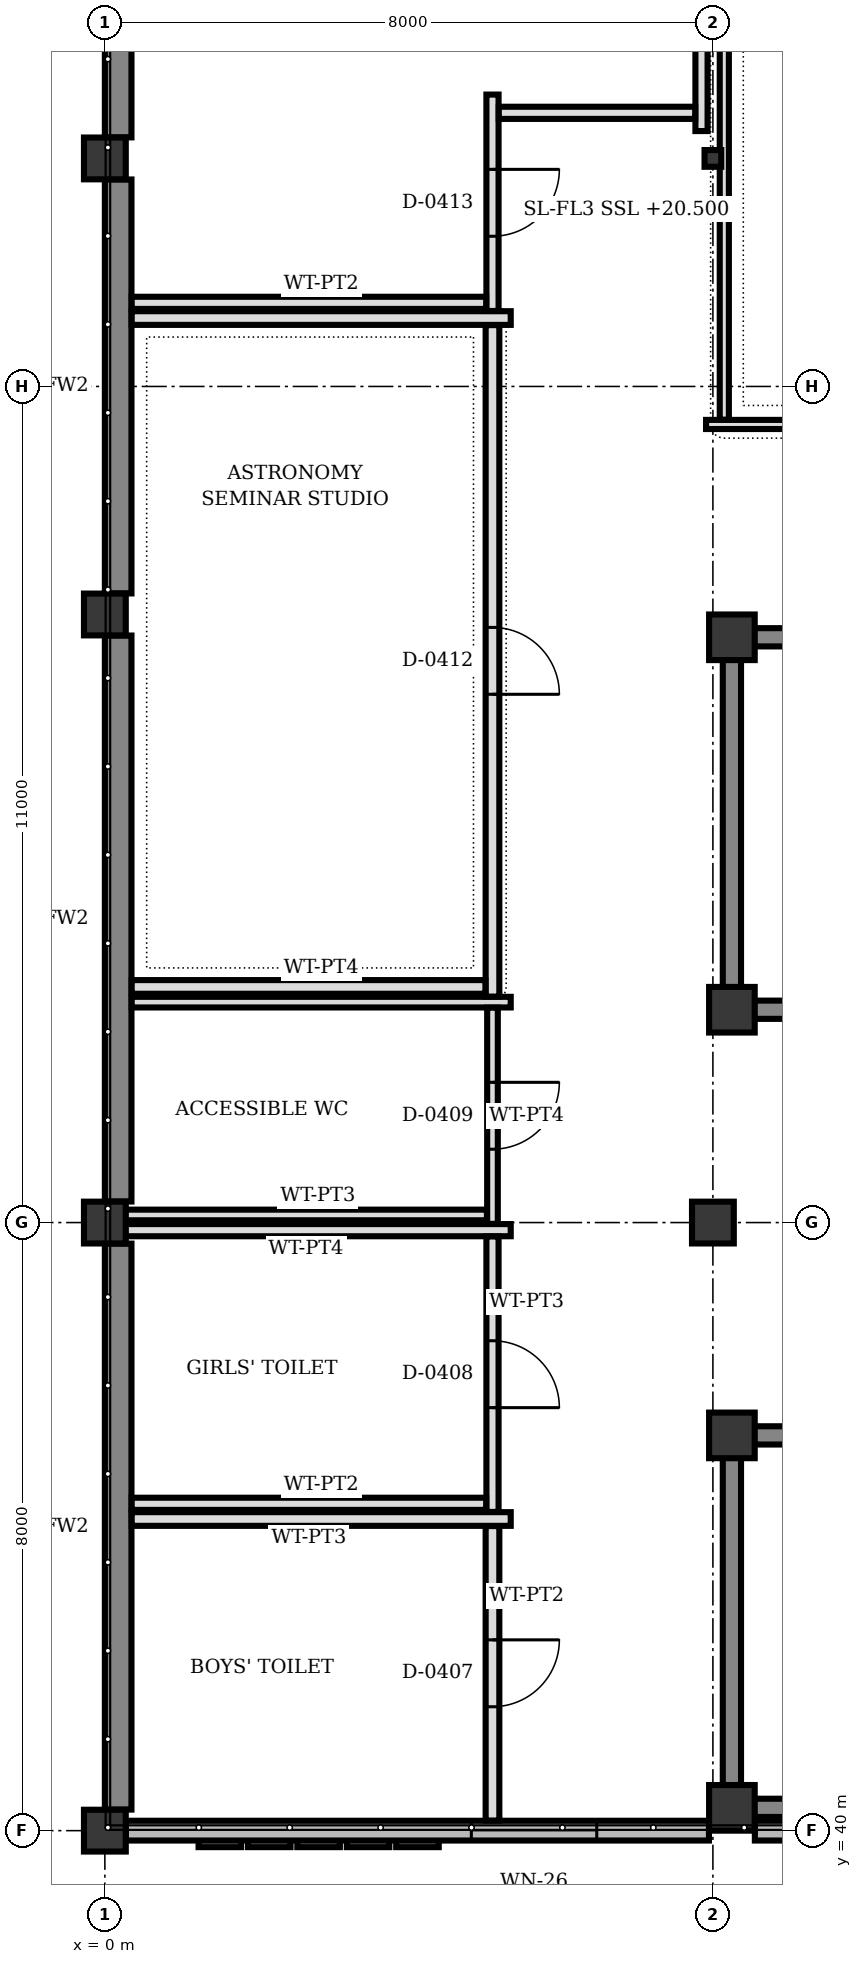
"""IFC4 building model, lengths in metres.
Left out: names, types, materials, properties, quantities, classifications, styles, units other than length and angle.
Written with IfcOpenShell. Run it as: python <this file> out.ifc"""

import sys

from ifc_helpers import new_model, si_unit, direction, frame, frame_2d, origin, origin_2d, place, context, subcontext, project, spatial, rectangle, hollow_rectangle, extrude, element, fill, save


model = new_model("IFC4")
c1 = context("Model", 3, precision=1e-05, world=origin(), true_north=direction((0.0, 1.0)))
c2 = subcontext(c1, "Body", "Model", "MODEL_VIEW")
j1 = project(units=[si_unit("LENGTHUNIT", "METRE"), si_unit("PLANEANGLEUNIT", "RADIAN")], contexts=[c1])
p1 = place(None, origin())
s1 = spatial("IfcSite", under=j1, at=p1, CompositionType="ELEMENT")
p2 = place(p1, origin())
s2 = spatial("IfcBuilding", under=s1, at=p2, CompositionType="ELEMENT")
p3 = place(p2, frame((0.0, 0.0, 20.5)))
s3 = spatial("IfcBuildingStorey", under=s2, at=p3, CompositionType="ELEMENT", Elevation=20.5)
for number, where, z_axis, x_axis in (
    (1, (8.25, 40.3, 0.0), (0.0, 0.0, 1.0), (1.0, 0.0, 0.0)),
    (2, (8.25, 45.2, 0.0), (0.0, 0.0, 1.0), (1.0, 0.0, 0.0)),
    (3, (8.25, 50.8, 0.0), (0.0, 0.0, 1.0), (1.0, 0.0, 0.0)),
    (4, (8.25, 55.7, 0.0), (0.0, 0.0, 1.0), (1.0, 0.0, 0.0)),
):
    element("IfcColumn", number, at=place(p3, frame(where, z_axis=z_axis, x_axis=x_axis)), inside=s3, PredefinedType="COLUMN", context=c2, shape_type="SweptSolid", body=[
        extrude(rectangle(XDim=0.6, YDim=0.6, at=origin_2d()), origin(), (0.0, 0.0, 1.0), 4.0),
    ])
for number, where, z_axis, x_axis in (
    (5, (0.0, 40.0, 0.0), (0.0, 0.0, 1.0), (1.0, 0.0, 0.0)),
    (6, (0.0, 48.0, 0.0), (0.0, 0.0, 1.0), (1.0, 0.0, 0.0)),
    (7, (0.0, 56.0, 0.0), (0.0, 0.0, 1.0), (1.0, 0.0, 0.0)),
    (8, (0.0, 62.0, 0.0), (0.0, 0.0, 1.0), (1.0, 0.0, 0.0)),
    (9, (8.0, 48.0, 0.0), (0.0, 0.0, 1.0), (1.0, 0.0, 0.0)),
):
    element("IfcColumn", number, at=place(p3, frame(where, z_axis=z_axis, x_axis=x_axis)), inside=s3, PredefinedType="COLUMN", context=c2, shape_type="SweptSolid", body=[
        extrude(rectangle(XDim=0.55, YDim=0.55, at=origin_2d()), origin(), (0.0, 0.0, 1.0), 4.0),
    ])
p4 = place(p3, frame((8.0, 62.0, 0.0), z_axis=(0.0, 0.0, 1.0), x_axis=(1.0, 0.0, 0.0)))
e10 = element("IfcColumn", 10, at=p4, inside=s3, PredefinedType="COLUMN", context=c2, shape_type="SweptSolid", body=[
    extrude(hollow_rectangle(XDim=0.22, YDim=0.22, WallThickness=0.01, at=origin_2d()), origin(), (0.0, 0.0, 1.0), 4.0),
])
p5 = place(p3, frame((16.0, 40.0, 0.0), z_axis=(0.0, 0.0, 1.0), x_axis=(-1.0, 0.0, 0.0)))
e11 = element("IfcWall", 11, at=p5, inside=s3, PredefinedType="SOLIDWALL", context=c2, shape_type="SweptSolid", body=[
    extrude(rectangle(XDim=7.448, YDim=0.26, at=frame_2d((3.724, 0.0))), origin(), (0.0, 0.0, 1.0), 3.55),
])
p6 = place(p3, frame((7.948, 40.0, 0.0), z_axis=(0.0, 0.0, 1.0), x_axis=(-1.0, 0.0, 0.0)))
e12 = element("IfcWall", 12, at=p6, inside=s3, PredefinedType="SOLIDWALL", context=c2, shape_type="SweptSolid", body=[
    extrude(rectangle(XDim=7.671, YDim=0.26, at=frame_2d((3.835, 0.0))), origin(), (0.0, 0.0, 1.0), 3.55),
])
p7 = place(p6, frame((1.476, 0.0, 0.9)))
e13 = element("IfcOpeningElement", 13, at=p7, cuts=e12, PredefinedType="OPENING", context=c2, shape_type="SweptSolid", body=[
    extrude(rectangle(XDim=1.65, YDim=1.4, at=frame_2d((0.825, 0.7))), frame((0.0, 0.14, 0.0), z_axis=(0.0, -1.0, 0.0), x_axis=(1.0, 0.0, 0.0)), (0.0, 0.0, 1.0), 0.28),
])
p8 = place(p3, frame((0.175, 40.277, 0.0), z_axis=(0.0, 0.0, 1.0), x_axis=(0.0, 1.0, 0.0)))
e14 = element("IfcWall", 14, at=p8, inside=s3, PredefinedType="SHEAR", context=c2, shape_type="SweptSolid", body=[
    extrude(rectangle(XDim=7.446, YDim=0.35, at=frame_2d((3.723, 0.0))), origin(), (0.0, 0.0, 1.0), 3.397),
])
p9 = place(p3, frame((0.175, 48.277, 0.0), z_axis=(0.0, 0.0, 1.0), x_axis=(0.0, 1.0, 0.0)))
e15 = element("IfcWall", 15, at=p9, inside=s3, PredefinedType="SHEAR", context=c2, shape_type="SweptSolid", body=[
    extrude(rectangle(XDim=7.446, YDim=0.35, at=frame_2d((3.723, 0.0))), origin(), (0.0, 0.0, 1.0), 3.435),
])
p10 = place(p3, frame((0.175, 56.277, 0.0), z_axis=(0.0, 0.0, 1.0), x_axis=(0.0, 1.0, 0.0)))
e16 = element("IfcWall", 16, at=p10, inside=s3, PredefinedType="SHEAR", context=c2, shape_type="SweptSolid", body=[
    extrude(rectangle(XDim=5.446, YDim=0.35, at=frame_2d((2.723, 0.0))), origin(), (0.0, 0.0, 1.0), 3.545),
])
p11 = place(p3, frame((0.175, 62.277, 0.0), z_axis=(0.0, 0.0, 1.0), x_axis=(0.0, 1.0, 0.0)))
e17 = element("IfcWall", 17, at=p11, inside=s3, PredefinedType="SHEAR", context=c2, shape_type="SweptSolid", body=[
    extrude(rectangle(XDim=5.446, YDim=0.35, at=frame_2d((2.723, 0.0))), origin(), (0.0, 0.0, 1.0), 3.397),
])
p12 = place(p3, frame((8.25, 40.592, 0.0), z_axis=(0.0, 0.0, 1.0), x_axis=(0.0, 1.0, 0.0)))
e18 = element("IfcWall", 18, at=p12, inside=s3, PredefinedType="SHEAR", context=c2, shape_type="SweptSolid", body=[
    extrude(rectangle(XDim=4.316, YDim=0.24, at=frame_2d((2.158, 0.0))), origin(), (0.0, 0.0, 1.0), 3.74),
])
p13 = place(p3, frame((15.927, 40.3, 0.0), z_axis=(0.0, 0.0, 1.0), x_axis=(-1.0, 0.0, 0.0)))
e19 = element("IfcWall", 19, at=p13, inside=s3, PredefinedType="SHEAR", context=c2, shape_type="SweptSolid", body=[
    extrude(rectangle(XDim=7.385, YDim=0.24, at=frame_2d((3.692, 0.0))), origin(), (0.0, 0.0, 1.0), 3.74),
])
p14 = place(p3, frame((15.758, 45.2, 0.0), z_axis=(0.0, 0.0, 1.0), x_axis=(-1.0, 0.0, 0.0)))
e20 = element("IfcWall", 20, at=p14, inside=s3, PredefinedType="SHEAR", context=c2, shape_type="SweptSolid", body=[
    extrude(rectangle(XDim=7.216, YDim=0.24, at=frame_2d((3.608, 0.0))), origin(), (0.0, 0.0, 1.0), 3.74),
])
p15 = place(p14, frame((5.694, 0.0, 0.0)))
e21 = element("IfcOpeningElement", 21, at=p15, cuts=e20, PredefinedType="OPENING", context=c2, shape_type="SweptSolid", body=[
    extrude(rectangle(XDim=0.88, YDim=2.1, at=frame_2d((0.44, 1.05))), frame((0.0, 0.13, 0.0), z_axis=(0.0, -1.0, 0.0), x_axis=(1.0, 0.0, 0.0)), (0.0, 0.0, 1.0), 0.26),
])
p16 = place(p3, frame((8.25, 51.092, 0.0), z_axis=(0.0, 0.0, 1.0), x_axis=(0.0, 1.0, 0.0)))
e22 = element("IfcWall", 22, at=p16, inside=s3, PredefinedType="SHEAR", context=c2, shape_type="SweptSolid", body=[
    extrude(rectangle(XDim=4.316, YDim=0.24, at=frame_2d((2.158, 0.0))), origin(), (0.0, 0.0, 1.0), 3.74),
])
p17 = place(p3, frame((15.758, 50.8, 0.0), z_axis=(0.0, 0.0, 1.0), x_axis=(-1.0, 0.0, 0.0)))
e23 = element("IfcWall", 23, at=p17, inside=s3, PredefinedType="SHEAR", context=c2, shape_type="SweptSolid", body=[
    extrude(rectangle(XDim=7.216, YDim=0.24, at=frame_2d((3.608, 0.0))), origin(), (0.0, 0.0, 1.0), 3.74),
])
p18 = place(p17, frame((5.694, 0.0, 0.0)))
e24 = element("IfcOpeningElement", 24, at=p18, cuts=e23, PredefinedType="OPENING", context=c2, shape_type="SweptSolid", body=[
    extrude(rectangle(XDim=0.88, YDim=2.1, at=frame_2d((0.44, 1.05))), frame((0.0, 0.13, 0.0), z_axis=(0.0, -1.0, 0.0), x_axis=(1.0, 0.0, 0.0)), (0.0, 0.0, 1.0), 0.26),
])
p19 = place(p3, frame((15.927, 55.7, 0.0), z_axis=(0.0, 0.0, 1.0), x_axis=(-1.0, 0.0, 0.0)))
e25 = element("IfcWall", 25, at=p19, inside=s3, PredefinedType="SHEAR", context=c2, shape_type="SweptSolid", body=[
    extrude(rectangle(XDim=7.385, YDim=0.24, at=frame_2d((3.692, 0.0))), origin(), (0.0, 0.0, 1.0), 3.74),
])
p20 = place(p3, frame((0.353, 44.1, 0.0), z_axis=(0.0, 0.0, 1.0), x_axis=(1.0, 0.0, 0.0)))
e26 = element("IfcWall", 26, at=p20, inside=s3, PredefinedType="PARTITIONING", context=c2, shape_type="SweptSolid", body=[
    extrude(rectangle(XDim=4.987, YDim=0.18, at=frame_2d((2.494, 0.0))), origin(), (0.0, 0.0, 1.0), 3.7),
])
p21 = place(p3, frame((5.1, 44.007, 0.0), z_axis=(0.0, 0.0, 1.0), x_axis=(0.0, -1.0, 0.0)))
e27 = element("IfcWall", 27, at=p21, inside=s3, PredefinedType="PARTITIONING", context=c2, shape_type="SweptSolid", body=[
    extrude(rectangle(XDim=3.874, YDim=0.18, at=frame_2d((1.937, 0.0))), origin(), (0.0, 0.0, 1.0), 3.7),
])
p22 = place(p21, frame((1.497, 0.0, 0.0)))
e28 = element("IfcOpeningElement", 28, at=p22, cuts=e27, PredefinedType="OPENING", context=c2, shape_type="SweptSolid", body=[
    extrude(rectangle(XDim=0.88, YDim=2.1, at=frame_2d((0.44, 1.05))), frame((0.0, 0.1, 0.0), z_axis=(0.0, -1.0, 0.0), x_axis=(1.0, 0.0, 0.0)), (0.0, 0.0, 1.0), 0.2),
])
p23 = place(p3, frame((0.267, 47.9, 0.0), z_axis=(0.0, 0.0, 1.0), x_axis=(1.0, 0.0, 0.0)))
e29 = element("IfcWall", 29, at=p23, inside=s3, PredefinedType="PARTITIONING", context=c2, shape_type="SweptSolid", body=[
    extrude(rectangle(XDim=5.073, YDim=0.16, at=frame_2d((2.537, 0.0))), origin(), (0.0, 0.0, 1.0), 3.14),
])
p24 = place(p3, frame((5.1, 47.817, 0.0), z_axis=(0.0, 0.0, 1.0), x_axis=(0.0, -1.0, 0.0)))
e30 = element("IfcWall", 30, at=p24, inside=s3, PredefinedType="PARTITIONING", context=c2, shape_type="SweptSolid", body=[
    extrude(rectangle(XDim=3.624, YDim=0.16, at=frame_2d((1.812, 0.0))), origin(), (0.0, 0.0, 1.0), 3.14),
])
p25 = place(p24, frame((1.372, 0.0, 0.0)))
e31 = element("IfcOpeningElement", 31, at=p25, cuts=e30, PredefinedType="OPENING", context=c2, shape_type="SweptSolid", body=[
    extrude(rectangle(XDim=0.88, YDim=2.1, at=frame_2d((0.44, 1.05))), frame((0.0, 0.09, 0.0), z_axis=(0.0, -1.0, 0.0), x_axis=(1.0, 0.0, 0.0)), (0.0, 0.0, 1.0), 0.18),
])
p26 = place(p3, frame((5.017, 44.3, 0.0), z_axis=(0.0, 0.0, 1.0), x_axis=(-1.0, 0.0, 0.0)))
e32 = element("IfcWall", 32, at=p26, inside=s3, PredefinedType="PARTITIONING", context=c2, shape_type="SweptSolid", body=[
    extrude(rectangle(XDim=4.664, YDim=0.16, at=frame_2d((2.332, 0.0))), origin(), (0.0, 0.0, 1.0), 3.7),
])
p27 = place(p3, frame((0.353, 50.9, 0.0), z_axis=(0.0, 0.0, 1.0), x_axis=(1.0, 0.0, 0.0)))
e33 = element("IfcWall", 33, at=p27, inside=s3, PredefinedType="PARTITIONING", context=c2, shape_type="SweptSolid", body=[
    extrude(rectangle(XDim=4.987, YDim=0.14, at=frame_2d((2.494, 0.0))), origin(), (0.0, 0.0, 1.0), 3.7),
])
p28 = place(p3, frame((5.1, 50.827, 0.0), z_axis=(0.0, 0.0, 1.0), x_axis=(0.0, -1.0, 0.0)))
e34 = element("IfcWall", 34, at=p28, inside=s3, PredefinedType="PARTITIONING", context=c2, shape_type="SweptSolid", body=[
    extrude(rectangle(XDim=2.844, YDim=0.14, at=frame_2d((1.422, 0.0))), origin(), (0.0, 0.0, 1.0), 3.14),
])
p29 = place(p28, frame((0.982, 0.0, 0.0)))
e35 = element("IfcOpeningElement", 35, at=p29, cuts=e34, PredefinedType="OPENING", context=c2, shape_type="SweptSolid", body=[
    extrude(rectangle(XDim=0.88, YDim=2.1, at=frame_2d((0.44, 1.05))), frame((0.0, 0.08, 0.0), z_axis=(0.0, -1.0, 0.0), x_axis=(1.0, 0.0, 0.0)), (0.0, 0.0, 1.0), 0.16),
])
p30 = place(p3, frame((5.027, 48.1, 0.0), z_axis=(0.0, 0.0, 1.0), x_axis=(-1.0, 0.0, 0.0)))
e36 = element("IfcWall", 36, at=p30, inside=s3, PredefinedType="PARTITIONING", context=c2, shape_type="SweptSolid", body=[
    extrude(rectangle(XDim=4.76, YDim=0.14, at=frame_2d((2.38, 0.0))), origin(), (0.0, 0.0, 1.0), 3.14),
])
p31 = place(p3, frame((15.787, 58.5, 0.0), z_axis=(0.0, 0.0, 1.0), x_axis=(-1.0, 0.0, 0.0)))
e37 = element("IfcWall", 37, at=p31, inside=s3, PredefinedType="PARTITIONING", context=c2, shape_type="SweptSolid", body=[
    extrude(rectangle(XDim=7.877, YDim=0.12, at=frame_2d((3.938, 0.0))), origin(), (0.0, 0.0, 1.0), 3.7),
])
p32 = place(p31, frame((3.499, 0.0, 0.0)))
e38 = element("IfcOpeningElement", 38, at=p32, cuts=e37, PredefinedType="OPENING", context=c2, shape_type="SweptSolid", body=[
    extrude(rectangle(XDim=0.88, YDim=2.1, at=frame_2d((0.44, 1.05))), frame((0.0, 0.07, 0.0), z_axis=(0.0, -1.0, 0.0), x_axis=(1.0, 0.0, 0.0)), (0.0, 0.0, 1.0), 0.14),
])
p33 = place(p3, frame((8.15, 58.563, 0.0), z_axis=(0.0, 0.0, 1.0), x_axis=(0.0, 1.0, 0.0)))
e39 = element("IfcWall", 39, at=p33, inside=s3, PredefinedType="PARTITIONING", context=c2, shape_type="SweptSolid", body=[
    extrude(rectangle(XDim=9.377, YDim=0.12, at=frame_2d((4.688, 0.0))), origin(), (0.0, 0.0, 1.0), 3.14),
])
p34 = place(p3, frame((0.353, 59.9, 0.0), z_axis=(0.0, 0.0, 1.0), x_axis=(1.0, 0.0, 0.0)))
e40 = element("IfcWall", 40, at=p34, inside=s3, PredefinedType="PARTITIONING", context=c2, shape_type="SweptSolid", body=[
    extrude(rectangle(XDim=4.987, YDim=0.18, at=frame_2d((2.494, 0.0))), origin(), (0.0, 0.0, 1.0), 3.7),
])
p35 = place(p3, frame((5.1, 59.807, 0.0), z_axis=(0.0, 0.0, 1.0), x_axis=(0.0, -1.0, 0.0)))
e41 = element("IfcWall", 41, at=p35, inside=s3, PredefinedType="PARTITIONING", context=c2, shape_type="SweptSolid", body=[
    extrude(rectangle(XDim=8.834, YDim=0.18, at=frame_2d((4.417, 0.0))), origin(), (0.0, 0.0, 1.0), 3.7),
])
p36 = place(p35, frame((3.977, 0.0, 0.0)))
e42 = element("IfcOpeningElement", 42, at=p36, cuts=e41, PredefinedType="OPENING", context=c2, shape_type="SweptSolid", body=[
    extrude(rectangle(XDim=0.88, YDim=2.1, at=frame_2d((0.44, 1.05))), frame((0.0, 0.1, 0.0), z_axis=(0.0, -1.0, 0.0), x_axis=(1.0, 0.0, 0.0)), (0.0, 0.0, 1.0), 0.2),
])
p37 = place(p3, frame((5.007, 51.1, 0.0), z_axis=(0.0, 0.0, 1.0), x_axis=(-1.0, 0.0, 0.0)))
e43 = element("IfcWall", 43, at=p37, inside=s3, PredefinedType="PARTITIONING", context=c2, shape_type="SweptSolid", body=[
    extrude(rectangle(XDim=4.654, YDim=0.18, at=frame_2d((2.327, 0.0))), origin(), (0.0, 0.0, 1.0), 3.7),
])
p38 = place(p3, frame((5.1, 62.84, 0.0), z_axis=(0.0, 0.0, 1.0), x_axis=(0.0, -1.0, 0.0)))
e44 = element("IfcWall", 44, at=p38, inside=s3, PredefinedType="PARTITIONING", context=c2, shape_type="SweptSolid", body=[
    extrude(rectangle(XDim=2.847, YDim=0.16, at=frame_2d((1.424, 0.0))), origin(), (0.0, 0.0, 1.0), 3.14),
])
p39 = place(p38, frame((0.984, 0.0, 0.0)))
e45 = element("IfcOpeningElement", 45, at=p39, cuts=e44, PredefinedType="OPENING", context=c2, shape_type="SweptSolid", body=[
    extrude(rectangle(XDim=0.88, YDim=2.1, at=frame_2d((0.44, 1.05))), frame((0.0, 0.09, 0.0), z_axis=(0.0, -1.0, 0.0), x_axis=(1.0, 0.0, 0.0)), (0.0, 0.0, 1.0), 0.18),
])
p40 = place(p3, frame((5.017, 60.1, 0.0), z_axis=(0.0, 0.0, 1.0), x_axis=(-1.0, 0.0, 0.0)))
e46 = element("IfcWall", 46, at=p40, inside=s3, PredefinedType="PARTITIONING", context=c2, shape_type="SweptSolid", body=[
    extrude(rectangle(XDim=4.664, YDim=0.16, at=frame_2d((2.332, 0.0))), origin(), (0.0, 0.0, 1.0), 3.7),
])
p41 = place(p3, frame((7.85, 67.867, 0.0), z_axis=(0.0, 0.0, 1.0), x_axis=(0.0, -1.0, 0.0)))
e47 = element("IfcWall", 47, at=p41, inside=s3, PredefinedType="PARTITIONING", context=c2, shape_type="SweptSolid", body=[
    extrude(rectangle(XDim=5.507, YDim=0.16, at=frame_2d((2.753, 0.0))), origin(), (0.0, 0.0, 1.0), 3.14),
])
p42 = place(p3, frame((7.767, 62.6, 0.0), z_axis=(0.0, 0.0, 1.0), x_axis=(-1.0, 0.0, 0.0)))
e48 = element("IfcWall", 48, at=p42, inside=s3, PredefinedType="PARTITIONING", context=c2, shape_type="SweptSolid", body=[
    extrude(rectangle(XDim=2.584, YDim=0.16, at=frame_2d((1.292, 0.0))), origin(), (0.0, 0.0, 1.0), 3.397),
])
p43 = place(p7, origin())
e49 = element("IfcWindow", 49, at=p43, inside=s3, PartitioningType="SINGLE_PANEL", PredefinedType="WINDOW", context=c2, shape_type="SweptSolid", body=[
    extrude(rectangle(XDim=1.65, YDim=1.4, at=frame_2d((0.825, 0.7))), frame((0.0, 0.03, 0.0), z_axis=(0.0, -1.0, 0.0), x_axis=(1.0, 0.0, 0.0)), (0.0, 0.0, 1.0), 0.06),
])
fill(e13, e49)
p44 = place(p22, origin())
e50 = element("IfcDoor", 50, at=p44, inside=s3, OperationType="SINGLE_SWING_LEFT", PredefinedType="DOOR", context=c2, shape_type="SweptSolid", body=[
    extrude(rectangle(XDim=0.88, YDim=2.1, at=frame_2d((0.44, 1.05))), frame((0.0, 0.025, 0.0), z_axis=(0.0, -1.0, 0.0), x_axis=(1.0, 0.0, 0.0)), (0.0, 0.0, 1.0), 0.05),
])
fill(e28, e50)
p45 = place(p25, origin())
e51 = element("IfcDoor", 51, at=p45, inside=s3, OperationType="SINGLE_SWING_RIGHT", PredefinedType="DOOR", context=c2, shape_type="SweptSolid", body=[
    extrude(rectangle(XDim=0.88, YDim=2.1, at=frame_2d((0.44, 1.05))), frame((0.0, 0.025, 0.0), z_axis=(0.0, -1.0, 0.0), x_axis=(1.0, 0.0, 0.0)), (0.0, 0.0, 1.0), 0.05),
])
fill(e31, e51)
p46 = place(p29, origin())
e52 = element("IfcDoor", 52, at=p46, inside=s3, OperationType="SINGLE_SWING_LEFT", PredefinedType="DOOR", context=c2, shape_type="SweptSolid", body=[
    extrude(rectangle(XDim=0.88, YDim=2.1, at=frame_2d((0.44, 1.05))), frame((0.0, 0.025, 0.0), z_axis=(0.0, -1.0, 0.0), x_axis=(1.0, 0.0, 0.0)), (0.0, 0.0, 1.0), 0.05),
])
fill(e35, e52)
p47 = place(p36, origin())
e53 = element("IfcDoor", 53, at=p47, inside=s3, OperationType="SINGLE_SWING_RIGHT", PredefinedType="DOOR", context=c2, shape_type="SweptSolid", body=[
    extrude(rectangle(XDim=0.88, YDim=2.1, at=frame_2d((0.44, 1.05))), frame((0.0, 0.025, 0.0), z_axis=(0.0, -1.0, 0.0), x_axis=(1.0, 0.0, 0.0)), (0.0, 0.0, 1.0), 0.05),
])
fill(e42, e53)
p48 = place(p39, origin())
e54 = element("IfcDoor", 54, at=p48, inside=s3, OperationType="SINGLE_SWING_LEFT", PredefinedType="DOOR", context=c2, shape_type="SweptSolid", body=[
    extrude(rectangle(XDim=0.88, YDim=2.1, at=frame_2d((0.44, 1.05))), frame((0.0, 0.025, 0.0), z_axis=(0.0, -1.0, 0.0), x_axis=(1.0, 0.0, 0.0)), (0.0, 0.0, 1.0), 0.05),
])
fill(e45, e54)
save(model, sys.argv[1])
